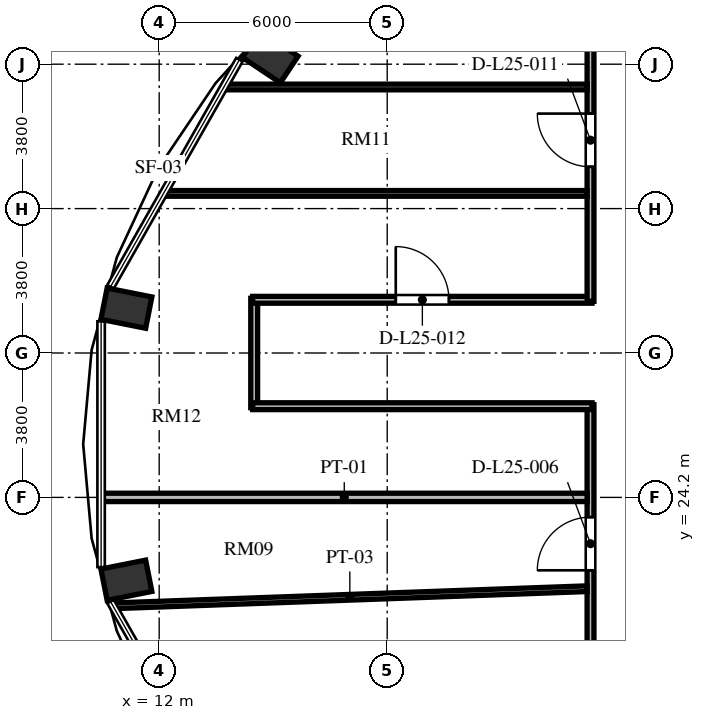
"""IFC4 building model, lengths in metres.
Left out: names, types, materials, properties, quantities, classifications, styles, units other than length and angle.
Written with IfcOpenShell. Run it as: python <this file> out.ifc"""

import sys

from ifc_helpers import new_model, si_unit, direction, frame, frame_2d, origin, origin_2d, place, context, subcontext, project, spatial, rectangle, extrude, element, fill, save


model = new_model("IFC4")
c1 = context("Model", 3, precision=1e-05, world=origin(), true_north=direction((0.0, 1.0)))
c2 = subcontext(c1, "Body", "Model", "MODEL_VIEW")
j1 = project(units=[si_unit("LENGTHUNIT", "METRE"), si_unit("PLANEANGLEUNIT", "RADIAN")], contexts=[c1])
p1 = place(None, origin())
s1 = spatial("IfcSite", under=j1, at=p1, CompositionType="ELEMENT")
p2 = place(p1, origin())
s2 = spatial("IfcBuilding", under=s1, at=p2, CompositionType="ELEMENT")
p3 = place(p2, frame((0.0, 0.0, 99.984)))
s3 = spatial("IfcBuildingStorey", under=s2, at=p3, CompositionType="ELEMENT", Elevation=99.984)
for number, where, z_axis, x_axis in (
    (1, (14.922, 35.795, 0.0), (0.0, 0.0, 1.0), (-0.831, 0.556, 0.0)),
    (2, (11.137, 29.18, 0.0), (0.0, 0.0, 1.0), (-0.981, 0.195, 0.0)),
    (3, (11.137, 22.02, 0.0), (0.0, 0.0, 1.0), (-0.981, -0.195, 0.0)),
):
    element("IfcColumn", number, at=place(p3, frame(where, z_axis=z_axis, x_axis=x_axis)), inside=s3, PredefinedType="COLUMN", context=c2, shape_type="SweptSolid", body=[
        extrude(rectangle(XDim=1.2, YDim=0.84, at=origin_2d()), origin(), (0.0, 0.0, 1.0), 3.648),
    ])
p4 = place(p3, frame((14.5, 26.56, 0.0), z_axis=(0.0, 0.0, 1.0), x_axis=(0.0, 1.0, 0.0)))
e4 = element("IfcWall", 4, at=p4, inside=s3, PredefinedType="PARTITIONING", context=c2, shape_type="SweptSolid", body=[
    extrude(rectangle(XDim=2.88, YDim=0.18, at=frame_2d((1.44, 0.0))), origin(), (0.0, 0.0, 1.0), 3.013),
])
p5 = place(p3, frame((14.46, 29.4, 0.0), z_axis=(0.0, 0.0, 1.0), x_axis=(1.0, 0.0, 0.0)))
e5 = element("IfcWall", 5, at=p5, inside=s3, PredefinedType="PARTITIONING", context=c2, shape_type="SweptSolid", body=[
    extrude(rectangle(XDim=8.93, YDim=0.18, at=frame_2d((4.465, 0.0))), origin(), (0.0, 0.0, 1.0), 3.428),
])
p6 = place(p5, frame((3.765, 0.0, 0.0)))
e6 = element("IfcOpeningElement", 6, at=p6, cuts=e5, PredefinedType="OPENING", context=c2, shape_type="SweptSolid", body=[
    extrude(rectangle(XDim=1.4, YDim=2.2, at=frame_2d((0.7, 1.1))), frame((0.0, 0.1, 0.0), z_axis=(0.0, -1.0, 0.0), x_axis=(1.0, 0.0, 0.0)), (0.0, 0.0, 1.0), 0.2),
])
p7 = place(p3, frame((23.35, 29.36, 0.0), z_axis=(0.0, 0.0, 1.0), x_axis=(0.0, 1.0, 0.0)))
e7 = element("IfcWall", 7, at=p7, inside=s3, PredefinedType="PARTITIONING", context=c2, shape_type="SweptSolid", body=[
    extrude(rectangle(XDim=9.43, YDim=0.18, at=frame_2d((4.715, 0.0))), origin(), (0.0, 0.0, 1.0), 3.428),
])
p8 = place(p7, frame((3.54, 0.0, 0.0)))
e8 = element("IfcOpeningElement", 8, at=p8, cuts=e7, PredefinedType="OPENING", context=c2, shape_type="SweptSolid", body=[
    extrude(rectangle(XDim=1.4, YDim=2.2, at=frame_2d((0.7, 1.1))), frame((0.0, 0.1, 0.0), z_axis=(0.0, -1.0, 0.0), x_axis=(1.0, 0.0, 0.0)), (0.0, 0.0, 1.0), 0.2),
])
p9 = place(p3, frame((23.35, 17.36, 0.0), z_axis=(0.0, 0.0, 1.0), x_axis=(0.0, 1.0, 0.0)))
e9 = element("IfcWall", 9, at=p9, inside=s3, PredefinedType="PARTITIONING", context=c2, shape_type="SweptSolid", body=[
    extrude(rectangle(XDim=9.28, YDim=0.18, at=frame_2d((4.64, 0.0))), origin(), (0.0, 0.0, 1.0), 3.428),
])
p10 = place(p9, frame((4.921, 0.0, 0.0)))
e10 = element("IfcOpeningElement", 10, at=p10, cuts=e9, PredefinedType="OPENING", context=c2, shape_type="SweptSolid", body=[
    extrude(rectangle(XDim=1.4, YDim=2.2, at=frame_2d((0.7, 1.1))), frame((0.0, 0.1, 0.0), z_axis=(0.0, -1.0, 0.0), x_axis=(1.0, 0.0, 0.0)), (0.0, 0.0, 1.0), 0.2),
])
p11 = place(p3, frame((23.39, 26.6, 0.0), z_axis=(0.0, 0.0, 1.0), x_axis=(-1.0, 0.0, 0.0)))
e11 = element("IfcWall", 11, at=p11, inside=s3, PredefinedType="PARTITIONING", context=c2, shape_type="SweptSolid", body=[
    extrude(rectangle(XDim=8.93, YDim=0.18, at=frame_2d((4.465, 0.0))), origin(), (0.0, 0.0, 1.0), 3.428),
])
p12 = place(p3, frame((10.774, 21.346, 0.0), z_axis=(0.0, 0.0, 1.0), x_axis=(0.999347780952, 0.036111116092, 0.0)))
e12 = element("IfcWall", 12, at=p12, inside=s3, PredefinedType="PARTITIONING", context=c2, shape_type="SweptSolid", body=[
    extrude(rectangle(XDim=12.494, YDim=0.15, at=frame_2d((6.247, 0.0))), origin(), (0.0, 0.0, 1.0), 2.813),
])
p13 = place(p3, frame((10.48, 24.2, 0.0), z_axis=(0.0, 0.0, 1.0), x_axis=(1.0, 0.0, 0.0)))
e13 = element("IfcWall", 13, at=p13, inside=s3, PredefinedType="PARTITIONING", context=c2, shape_type="SweptSolid", body=[
    extrude(rectangle(XDim=12.78, YDim=0.22, at=frame_2d((6.39, 0.0))), origin(), (0.0, 0.0, 1.0), 3.428),
])
p14 = place(p3, frame((12.121, 32.2, 0.0), z_axis=(0.0, 0.0, 1.0), x_axis=(1.0, 0.0, 0.0)))
e14 = element("IfcWall", 14, at=p14, inside=s3, PredefinedType="PARTITIONING", context=c2, shape_type="SweptSolid", body=[
    extrude(rectangle(XDim=11.139, YDim=0.15, at=frame_2d((5.57, 0.0))), origin(), (0.0, 0.0, 1.0), 3.428),
])
p15 = place(p3, frame((13.71, 35.0, 0.0), z_axis=(0.0, 0.0, 1.0), x_axis=(1.0, 0.0, 0.0)))
e15 = element("IfcWall", 15, at=p15, inside=s3, PredefinedType="PARTITIONING", context=c2, shape_type="SweptSolid", body=[
    extrude(rectangle(XDim=9.55, YDim=0.15, at=frame_2d((4.775, 0.0))), origin(), (0.0, 0.0, 1.0), 3.428),
])
p16 = place(p10, origin())
e16 = element("IfcDoor", 16, at=p16, inside=s3, OperationType="SINGLE_SWING_LEFT", PredefinedType="DOOR", context=c2, shape_type="SweptSolid", body=[
    extrude(rectangle(XDim=1.4, YDim=2.2, at=frame_2d((0.7, 1.1))), frame((0.0, 0.025, 0.0), z_axis=(0.0, -1.0, 0.0), x_axis=(1.0, 0.0, 0.0)), (0.0, 0.0, 1.0), 0.05),
])
fill(e10, e16)
p17 = place(p8, origin())
e17 = element("IfcDoor", 17, at=p17, inside=s3, OperationType="SINGLE_SWING_RIGHT", PredefinedType="DOOR", context=c2, shape_type="SweptSolid", body=[
    extrude(rectangle(XDim=1.4, YDim=2.2, at=frame_2d((0.7, 1.1))), frame((0.0, 0.025, 0.0), z_axis=(0.0, -1.0, 0.0), x_axis=(1.0, 0.0, 0.0)), (0.0, 0.0, 1.0), 0.05),
])
fill(e8, e17)
p18 = place(p6, origin())
e18 = element("IfcDoor", 18, at=p18, inside=s3, OperationType="SINGLE_SWING_LEFT", PredefinedType="DOOR", context=c2, shape_type="SweptSolid", body=[
    extrude(rectangle(XDim=1.4, YDim=2.2, at=frame_2d((0.7, 1.1))), frame((0.0, 0.025, 0.0), z_axis=(0.0, -1.0, 0.0), x_axis=(1.0, 0.0, 0.0)), (0.0, 0.0, 1.0), 0.05),
])
fill(e6, e18)
save(model, sys.argv[1])
